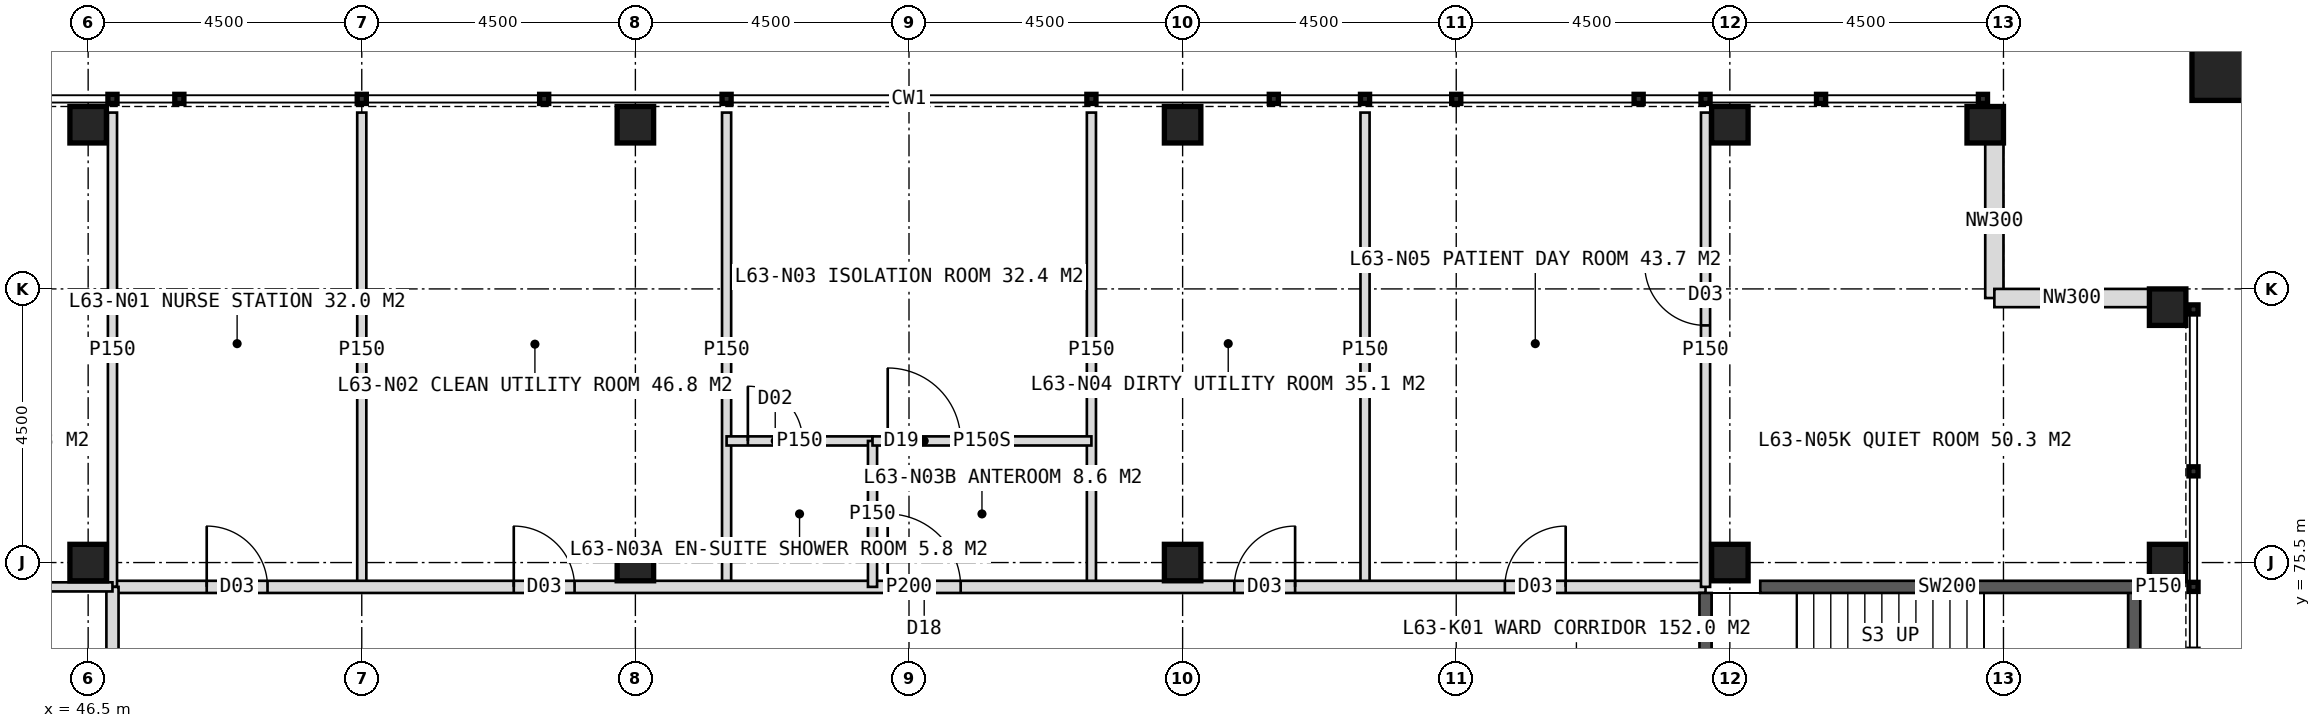
"""IFC4 building model, lengths in metres.
Left out: names, types, materials, properties, quantities, classifications, styles, units other than length and angle.
Written with IfcOpenShell. Run it as: python <this file> out.ifc"""

import sys

from ifc_helpers import new_model, si_unit, direction, frame, frame_2d, origin, origin_2d, place, context, subcontext, project, spatial, rectangle, hollow_rectangle, extrude, element, fill, save


model = new_model("IFC4")
c1 = context("Model", 3, precision=1e-05, world=origin(), true_north=direction((0.0, 1.0)))
c2 = subcontext(c1, "Body", "Model", "MODEL_VIEW")
j1 = project(units=[si_unit("LENGTHUNIT", "METRE"), si_unit("PLANEANGLEUNIT", "RADIAN")], contexts=[c1])
p1 = place(None, origin())
s1 = spatial("IfcSite", under=j1, at=p1, CompositionType="ELEMENT")
p2 = place(p1, origin())
s2 = spatial("IfcBuilding", under=s1, at=p2, CompositionType="ELEMENT")
p3 = place(p2, frame((0.0, 0.0, 262.0)))
s3 = spatial("IfcBuildingStorey", under=s2, at=p3, CompositionType="ELEMENT", Elevation=262.0)
for number, where, z_axis, x_axis in (
    (1, (73.5, 75.5, 0.0), (0.0, 0.0, 1.0), (1.0, 0.0, 0.0)),
    (2, (46.5, 75.5, 0.0), (0.0, 0.0, 1.0), (1.0, 0.0, 0.0)),
    (3, (55.5, 75.5, 0.0), (0.0, 0.0, 1.0), (1.0, 0.0, 0.0)),
    (4, (64.5, 75.5, 0.0), (0.0, 0.0, 1.0), (1.0, 0.0, 0.0)),
    (5, (46.5, 82.7, 0.0), (0.0, 0.0, 1.0), (1.0, 0.0, 0.0)),
    (6, (55.5, 82.7, 0.0), (0.0, 0.0, 1.0), (1.0, 0.0, 0.0)),
    (7, (64.5, 82.7, 0.0), (0.0, 0.0, 1.0), (1.0, 0.0, 0.0)),
    (8, (73.5, 82.7, 0.0), (0.0, 0.0, 1.0), (1.0, 0.0, 0.0)),
    (9, (80.7, 75.5, 0.0), (0.0, 0.0, 1.0), (1.0, 0.0, 0.0)),
    (10, (77.7, 82.7, 0.0), (0.0, 0.0, 1.0), (1.0, 0.0, 0.0)),
    (11, (80.7, 79.7, 0.0), (0.0, 0.0, 1.0), (1.0, 0.0, 0.0)),
):
    element("IfcColumn", number, at=place(p3, frame(where, z_axis=z_axis, x_axis=x_axis)), inside=s3, PredefinedType="COLUMN", context=c2, shape_type="SweptSolid", body=[
        extrude(hollow_rectangle(XDim=0.6, YDim=0.6, WallThickness=0.04, at=origin_2d()), origin(), (0.0, 0.0, 1.0), 4.0),
    ])
p4 = place(p3, frame((81.6, 83.6, 0.0), z_axis=(0.0, 0.0, 1.0), x_axis=(1.0, 0.0, 0.0)))
e12 = element("IfcColumn", 12, at=p4, inside=s3, PredefinedType="COLUMN", context=c2, shape_type="SweptSolid", body=[
    extrude(hollow_rectangle(XDim=1.0, YDim=1.0, WallThickness=0.06, at=origin_2d()), origin(), (0.0, 0.0, 1.0), 4.0),
])
for number, where, z_axis, x_axis in (
    (13, (77.85, 82.4, 0.0), (0.0, 0.0, 1.0), (0.0, -1.0, 0.0)),
    (14, (77.85, 79.85, 0.0), (0.0, 0.0, 1.0), (1.0, 0.0, 0.0)),
):
    element("IfcWall", number, at=place(p3, frame(where, z_axis=z_axis, x_axis=x_axis)), inside=s3, PredefinedType="ELEMENTEDWALL", context=c2, shape_type="SweptSolid", body=[
        extrude(rectangle(XDim=2.55, YDim=0.3, at=frame_2d((1.275, 0.0))), origin(), (0.0, 0.0, 1.0), 2.95),
    ])
for number, where, z_axis, x_axis in (
    (15, (51.0, 75.1, 0.0), (0.0, 0.0, 1.0), (0.0, 1.0, 0.0)),
    (16, (57.0, 75.1, 0.0), (0.0, 0.0, 1.0), (0.0, 1.0, 0.0)),
    (17, (63.0, 75.1, 0.0), (0.0, 0.0, 1.0), (0.0, 1.0, 0.0)),
    (18, (67.5, 75.1, 0.0), (0.0, 0.0, 1.0), (0.0, 1.0, 0.0)),
):
    element("IfcWall", number, at=place(p3, frame(where, z_axis=z_axis, x_axis=x_axis)), inside=s3, PredefinedType="PARTITIONING", context=c2, shape_type="SweptSolid", body=[
        extrude(rectangle(XDim=7.8, YDim=0.15, at=frame_2d((3.9, 0.0))), origin(), (0.0, 0.0, 1.0), 3.75),
    ])
p5 = place(p3, frame((46.9, 75.1, 0.0), z_axis=(0.0, 0.0, 1.0), x_axis=(1.0, 0.0, 0.0)))
e19 = element("IfcWall", 19, at=p5, inside=s3, PredefinedType="PARTITIONING", context=c2, shape_type="SweptSolid", body=[
    extrude(rectangle(XDim=26.2, YDim=0.2, at=frame_2d((13.1, 0.0))), origin(), (0.0, 0.0, 1.0), 3.75),
])
p6 = place(p5, frame((1.55, 0.0, 0.0)))
e20 = element("IfcOpeningElement", 20, at=p6, cuts=e19, PredefinedType="OPENING", context=c2, shape_type="SweptSolid", body=[
    extrude(rectangle(XDim=1.0, YDim=2.1, at=frame_2d((0.5, 1.05))), frame((0.0, 0.11, 0.0), z_axis=(0.0, -1.0, 0.0), x_axis=(1.0, 0.0, 0.0)), (0.0, 0.0, 1.0), 0.22),
])
p7 = place(p5, frame((6.6, 0.0, 0.0)))
e21 = element("IfcOpeningElement", 21, at=p7, cuts=e19, PredefinedType="OPENING", context=c2, shape_type="SweptSolid", body=[
    extrude(rectangle(XDim=1.0, YDim=2.1, at=frame_2d((0.5, 1.05))), frame((0.0, 0.11, 0.0), z_axis=(0.0, -1.0, 0.0), x_axis=(1.0, 0.0, 0.0)), (0.0, 0.0, 1.0), 0.22),
])
p8 = place(p5, frame((12.75, 0.0, 0.0)))
e22 = element("IfcOpeningElement", 22, at=p8, cuts=e19, PredefinedType="OPENING", context=c2, shape_type="SweptSolid", body=[
    extrude(rectangle(XDim=1.2, YDim=2.2, at=frame_2d((0.6, 1.1))), frame((0.0, 0.11, 0.0), z_axis=(0.0, -1.0, 0.0), x_axis=(1.0, 0.0, 0.0)), (0.0, 0.0, 1.0), 0.22),
])
p9 = place(p5, frame((18.45, 0.0, 0.0)))
e23 = element("IfcOpeningElement", 23, at=p9, cuts=e19, PredefinedType="OPENING", context=c2, shape_type="SweptSolid", body=[
    extrude(rectangle(XDim=1.0, YDim=2.1, at=frame_2d((0.5, 1.05))), frame((0.0, 0.11, 0.0), z_axis=(0.0, -1.0, 0.0), x_axis=(1.0, 0.0, 0.0)), (0.0, 0.0, 1.0), 0.22),
])
p10 = place(p5, frame((22.9, 0.0, 0.0)))
e24 = element("IfcOpeningElement", 24, at=p10, cuts=e19, PredefinedType="OPENING", context=c2, shape_type="SweptSolid", body=[
    extrude(rectangle(XDim=1.0, YDim=2.1, at=frame_2d((0.5, 1.05))), frame((0.0, 0.11, 0.0), z_axis=(0.0, -1.0, 0.0), x_axis=(1.0, 0.0, 0.0)), (0.0, 0.0, 1.0), 0.22),
])
p11 = place(p3, frame((46.9, 75.1, 0.0), z_axis=(0.0, 0.0, 1.0), x_axis=(0.0, 1.0, 0.0)))
e25 = element("IfcWall", 25, at=p11, inside=s3, PredefinedType="PARTITIONING", context=c2, shape_type="SweptSolid", body=[
    extrude(rectangle(XDim=7.8, YDim=0.15, at=frame_2d((3.9, 0.0))), origin(), (0.0, 0.0, 1.0), 3.75),
])
p12 = place(p3, frame((57.0, 77.5, 0.0), z_axis=(0.0, 0.0, 1.0), x_axis=(1.0, 0.0, 0.0)))
e26 = element("IfcWall", 26, at=p12, inside=s3, PredefinedType="PARTITIONING", context=c2, shape_type="SweptSolid", body=[
    extrude(rectangle(XDim=2.4, YDim=0.15, at=frame_2d((1.2, 0.0))), origin(), (0.0, 0.0, 1.0), 3.75),
])
p13 = place(p12, frame((0.35, 0.0, 0.0)))
e27 = element("IfcOpeningElement", 27, at=p13, cuts=e26, PredefinedType="OPENING", context=c2, shape_type="SweptSolid", body=[
    extrude(rectangle(XDim=0.9, YDim=2.1, at=frame_2d((0.45, 1.05))), frame((0.0, 0.085, 0.0), z_axis=(0.0, -1.0, 0.0), x_axis=(1.0, 0.0, 0.0)), (0.0, 0.0, 1.0), 0.17),
])
p14 = place(p3, frame((59.4, 75.1, 0.0), z_axis=(0.0, 0.0, 1.0), x_axis=(0.0, 1.0, 0.0)))
e28 = element("IfcWall", 28, at=p14, inside=s3, PredefinedType="PARTITIONING", context=c2, shape_type="SweptSolid", body=[
    extrude(rectangle(XDim=2.4, YDim=0.15, at=frame_2d((1.2, 0.0))), origin(), (0.0, 0.0, 1.0), 3.75),
])
p15 = place(p3, frame((59.4, 77.5, 0.0), z_axis=(0.0, 0.0, 1.0), x_axis=(1.0, 0.0, 0.0)))
e29 = element("IfcWall", 29, at=p15, inside=s3, PredefinedType="PARTITIONING", context=c2, shape_type="SweptSolid", body=[
    extrude(rectangle(XDim=3.6, YDim=0.15, at=frame_2d((1.8, 0.0))), origin(), (0.0, 0.0, 1.0), 3.75),
])
p16 = place(p15, frame((0.25, 0.0, 0.0)))
e30 = element("IfcOpeningElement", 30, at=p16, cuts=e29, PredefinedType="OPENING", context=c2, shape_type="SweptSolid", body=[
    extrude(rectangle(XDim=1.2, YDim=2.2, at=frame_2d((0.6, 1.1))), frame((0.0, 0.085, 0.0), z_axis=(0.0, -1.0, 0.0), x_axis=(1.0, 0.0, 0.0)), (0.0, 0.0, 1.0), 0.17),
])
p17 = place(p3, frame((73.1, 75.1, 0.0), z_axis=(0.0, 0.0, 1.0), x_axis=(0.0, 1.0, 0.0)))
e31 = element("IfcWall", 31, at=p17, inside=s3, PredefinedType="PARTITIONING", context=c2, shape_type="SweptSolid", body=[
    extrude(rectangle(XDim=7.8, YDim=0.15, at=frame_2d((3.9, 0.0))), origin(), (0.0, 0.0, 1.0), 3.75),
])
p18 = place(p17, frame((4.3, 0.0, 0.0)))
e32 = element("IfcOpeningElement", 32, at=p18, cuts=e31, PredefinedType="OPENING", context=c2, shape_type="SweptSolid", body=[
    extrude(rectangle(XDim=1.0, YDim=2.1, at=frame_2d((0.5, 1.05))), frame((0.0, 0.085, 0.0), z_axis=(0.0, -1.0, 0.0), x_axis=(1.0, 0.0, 0.0)), (0.0, 0.0, 1.0), 0.17),
])
p19 = place(p3, frame((46.9, 48.9, 0.0), z_axis=(0.0, 0.0, 1.0), x_axis=(0.0, 1.0, 0.0)))
e33 = element("IfcWall", 33, at=p19, inside=s3, PredefinedType="PARTITIONING", context=c2, shape_type="SweptSolid", body=[
    extrude(rectangle(XDim=26.2, YDim=0.2, at=frame_2d((13.1, 0.0))), origin(), (0.0, 0.0, 1.0), 3.75),
])
p20 = place(p19, frame((1.75, 0.0, 0.0)))
e34 = element("IfcOpeningElement", 34, at=p20, cuts=e33, PredefinedType="OPENING", context=c2, shape_type="SweptSolid", body=[
    extrude(rectangle(XDim=1.2, YDim=2.2, at=frame_2d((0.6, 1.1))), frame((0.0, 0.11, 0.0), z_axis=(0.0, -1.0, 0.0), x_axis=(1.0, 0.0, 0.0)), (0.0, 0.0, 1.0), 0.22),
])
p21 = place(p19, frame((6.75, 0.0, 0.0)))
e35 = element("IfcOpeningElement", 35, at=p21, cuts=e33, PredefinedType="OPENING", context=c2, shape_type="SweptSolid", body=[
    extrude(rectangle(XDim=1.0, YDim=2.1, at=frame_2d((0.5, 1.05))), frame((0.0, 0.11, 0.0), z_axis=(0.0, -1.0, 0.0), x_axis=(1.0, 0.0, 0.0)), (0.0, 0.0, 1.0), 0.22),
])
p22 = place(p19, frame((11.1, 0.0, 0.0)))
e36 = element("IfcOpeningElement", 36, at=p22, cuts=e33, PredefinedType="OPENING", context=c2, shape_type="SweptSolid", body=[
    extrude(rectangle(XDim=1.0, YDim=2.1, at=frame_2d((0.5, 1.05))), frame((0.0, 0.11, 0.0), z_axis=(0.0, -1.0, 0.0), x_axis=(1.0, 0.0, 0.0)), (0.0, 0.0, 1.0), 0.22),
])
p23 = place(p19, frame((14.1, 0.0, 0.0)))
e37 = element("IfcOpeningElement", 37, at=p23, cuts=e33, PredefinedType="OPENING", context=c2, shape_type="SweptSolid", body=[
    extrude(rectangle(XDim=1.0, YDim=2.1, at=frame_2d((0.5, 1.05))), frame((0.0, 0.11, 0.0), z_axis=(0.0, -1.0, 0.0), x_axis=(1.0, 0.0, 0.0)), (0.0, 0.0, 1.0), 0.22),
])
p24 = place(p19, frame((18.6, 0.0, 0.0)))
e38 = element("IfcOpeningElement", 38, at=p24, cuts=e33, PredefinedType="OPENING", context=c2, shape_type="SweptSolid", body=[
    extrude(rectangle(XDim=1.0, YDim=2.1, at=frame_2d((0.5, 1.05))), frame((0.0, 0.11, 0.0), z_axis=(0.0, -1.0, 0.0), x_axis=(1.0, 0.0, 0.0)), (0.0, 0.0, 1.0), 0.22),
])
p25 = place(p19, frame((23.65, 0.0, 0.0)))
e39 = element("IfcOpeningElement", 39, at=p25, cuts=e33, PredefinedType="OPENING", context=c2, shape_type="SweptSolid", body=[
    extrude(rectangle(XDim=1.0, YDim=2.1, at=frame_2d((0.5, 1.05))), frame((0.0, 0.11, 0.0), z_axis=(0.0, -1.0, 0.0), x_axis=(1.0, 0.0, 0.0)), (0.0, 0.0, 1.0), 0.22),
])
p26 = place(p3, frame((46.9, 75.1, 0.0), z_axis=(0.0, 0.0, 1.0), x_axis=(-1.0, 0.0, 0.0)))
e40 = element("IfcWall", 40, at=p26, inside=s3, PredefinedType="PARTITIONING", context=c2, shape_type="SweptSolid", body=[
    extrude(rectangle(XDim=7.8, YDim=0.15, at=frame_2d((3.9, 0.0))), origin(), (0.0, 0.0, 1.0), 3.75),
])
p27 = place(p26, frame((4.3, 0.0, 0.0)))
e41 = element("IfcOpeningElement", 41, at=p27, cuts=e40, PredefinedType="OPENING", context=c2, shape_type="SweptSolid", body=[
    extrude(rectangle(XDim=1.0, YDim=2.1, at=frame_2d((0.5, 1.05))), frame((0.0, 0.085, 0.0), z_axis=(0.0, -1.0, 0.0), x_axis=(1.0, 0.0, 0.0)), (0.0, 0.0, 1.0), 0.17),
])
p28 = place(p3, frame((80.2, 75.1, 0.0), z_axis=(0.0, 0.0, 1.0), x_axis=(1.0, 0.0, 0.0)))
e42 = element("IfcWall", 42, at=p28, inside=s3, PredefinedType="PARTITIONING", context=c2, shape_type="SweptSolid", body=[
    extrude(rectangle(XDim=0.7, YDim=0.15, at=frame_2d((0.35, 0.0))), origin(), (0.0, 0.0, 1.0), 3.75),
])
p29 = place(p3, frame((73.1, 75.0, 0.0), z_axis=(0.0, 0.0, 1.0), x_axis=(0.0, -1.0, 0.0)))
e43 = element("IfcWall", 43, at=p29, inside=s3, PredefinedType="SOLIDWALL", context=c2, shape_type="SweptSolid", body=[
    extrude(rectangle(XDim=4.0, YDim=0.2, at=frame_2d((2.0, 0.0))), origin(), (0.0, 0.0, 1.0), 3.75),
])
p30 = place(p29, frame((1.5, 0.0, 0.0)))
e44 = element("IfcOpeningElement", 44, at=p30, cuts=e43, PredefinedType="OPENING", context=c2, shape_type="SweptSolid", body=[
    extrude(rectangle(XDim=1.2, YDim=2.1, at=frame_2d((0.6, 1.05))), frame((0.0, 0.11, 0.0), z_axis=(0.0, -1.0, 0.0), x_axis=(1.0, 0.0, 0.0)), (0.0, 0.0, 1.0), 0.22),
])
p31 = place(p3, frame((80.15, 71.0, 0.0), z_axis=(0.0, 0.0, 1.0), x_axis=(0.0, 1.0, 0.0)))
e45 = element("IfcWall", 45, at=p31, inside=s3, PredefinedType="SOLIDWALL", context=c2, shape_type="SweptSolid", body=[
    extrude(rectangle(XDim=4.1, YDim=0.2, at=frame_2d((2.05, 0.0))), origin(), (0.0, 0.0, 1.0), 3.75),
])
p32 = place(p3, frame((74.0, 75.1, 0.0), z_axis=(0.0, 0.0, 1.0), x_axis=(1.0, 0.0, 0.0)))
e46 = element("IfcWall", 46, at=p32, inside=s3, PredefinedType="SOLIDWALL", context=c2, shape_type="SweptSolid", body=[
    extrude(rectangle(XDim=6.15, YDim=0.2, at=frame_2d((3.075, 0.0))), origin(), (0.0, 0.0, 1.0), 3.75),
])
p33 = place(p6, origin())
e47 = element("IfcDoor", 47, at=p33, inside=s3, OperationType="SINGLE_SWING_LEFT", PredefinedType="DOOR", context=c2, shape_type="SweptSolid", body=[
    extrude(rectangle(XDim=1.0, YDim=2.1, at=frame_2d((0.5, 1.05))), frame((0.0, 0.025, 0.0), z_axis=(0.0, -1.0, 0.0), x_axis=(1.0, 0.0, 0.0)), (0.0, 0.0, 1.0), 0.05),
])
fill(e20, e47)
p34 = place(p7, origin())
e48 = element("IfcDoor", 48, at=p34, inside=s3, OperationType="SINGLE_SWING_LEFT", PredefinedType="DOOR", context=c2, shape_type="SweptSolid", body=[
    extrude(rectangle(XDim=1.0, YDim=2.1, at=frame_2d((0.5, 1.05))), frame((0.0, 0.025, 0.0), z_axis=(0.0, -1.0, 0.0), x_axis=(1.0, 0.0, 0.0)), (0.0, 0.0, 1.0), 0.05),
])
fill(e21, e48)
p35 = place(p16, origin())
e49 = element("IfcDoor", 49, at=p35, inside=s3, OperationType="SINGLE_SWING_LEFT", PredefinedType="DOOR", context=c2, shape_type="SweptSolid", body=[
    extrude(rectangle(XDim=1.2, YDim=2.2, at=frame_2d((0.6, 1.1))), frame((0.0, 0.025, 0.0), z_axis=(0.0, -1.0, 0.0), x_axis=(1.0, 0.0, 0.0)), (0.0, 0.0, 1.0), 0.05),
])
fill(e30, e49)
p36 = place(p8, origin())
e50 = element("IfcDoor", 50, at=p36, inside=s3, OperationType="SINGLE_SWING_LEFT", PredefinedType="DOOR", context=c2, shape_type="SweptSolid", body=[
    extrude(rectangle(XDim=1.2, YDim=2.2, at=frame_2d((0.6, 1.1))), frame((0.0, 0.025, 0.0), z_axis=(0.0, -1.0, 0.0), x_axis=(1.0, 0.0, 0.0)), (0.0, 0.0, 1.0), 0.05),
])
fill(e22, e50)
p37 = place(p13, origin())
e51 = element("IfcDoor", 51, at=p37, inside=s3, OperationType="SINGLE_SWING_LEFT", PredefinedType="DOOR", context=c2, shape_type="SweptSolid", body=[
    extrude(rectangle(XDim=0.9, YDim=2.1, at=frame_2d((0.45, 1.05))), frame((0.0, 0.025, 0.0), z_axis=(0.0, -1.0, 0.0), x_axis=(1.0, 0.0, 0.0)), (0.0, 0.0, 1.0), 0.05),
])
fill(e27, e51)
p38 = place(p9, origin())
e52 = element("IfcDoor", 52, at=p38, inside=s3, OperationType="SINGLE_SWING_RIGHT", PredefinedType="DOOR", context=c2, shape_type="SweptSolid", body=[
    extrude(rectangle(XDim=1.0, YDim=2.1, at=frame_2d((0.5, 1.05))), frame((0.0, 0.025, 0.0), z_axis=(0.0, -1.0, 0.0), x_axis=(1.0, 0.0, 0.0)), (0.0, 0.0, 1.0), 0.05),
])
fill(e23, e52)
p39 = place(p18, origin())
e53 = element("IfcDoor", 53, at=p39, inside=s3, OperationType="SINGLE_SWING_RIGHT", PredefinedType="DOOR", context=c2, shape_type="SweptSolid", body=[
    extrude(rectangle(XDim=1.0, YDim=2.1, at=frame_2d((0.5, 1.05))), frame((0.0, 0.025, 0.0), z_axis=(0.0, -1.0, 0.0), x_axis=(1.0, 0.0, 0.0)), (0.0, 0.0, 1.0), 0.05),
])
fill(e32, e53)
p40 = place(p10, origin())
e54 = element("IfcDoor", 54, at=p40, inside=s3, OperationType="SINGLE_SWING_RIGHT", PredefinedType="DOOR", context=c2, shape_type="SweptSolid", body=[
    extrude(rectangle(XDim=1.0, YDim=2.1, at=frame_2d((0.5, 1.05))), frame((0.0, 0.025, 0.0), z_axis=(0.0, -1.0, 0.0), x_axis=(1.0, 0.0, 0.0)), (0.0, 0.0, 1.0), 0.05),
])
fill(e24, e54)
save(model, sys.argv[1])
